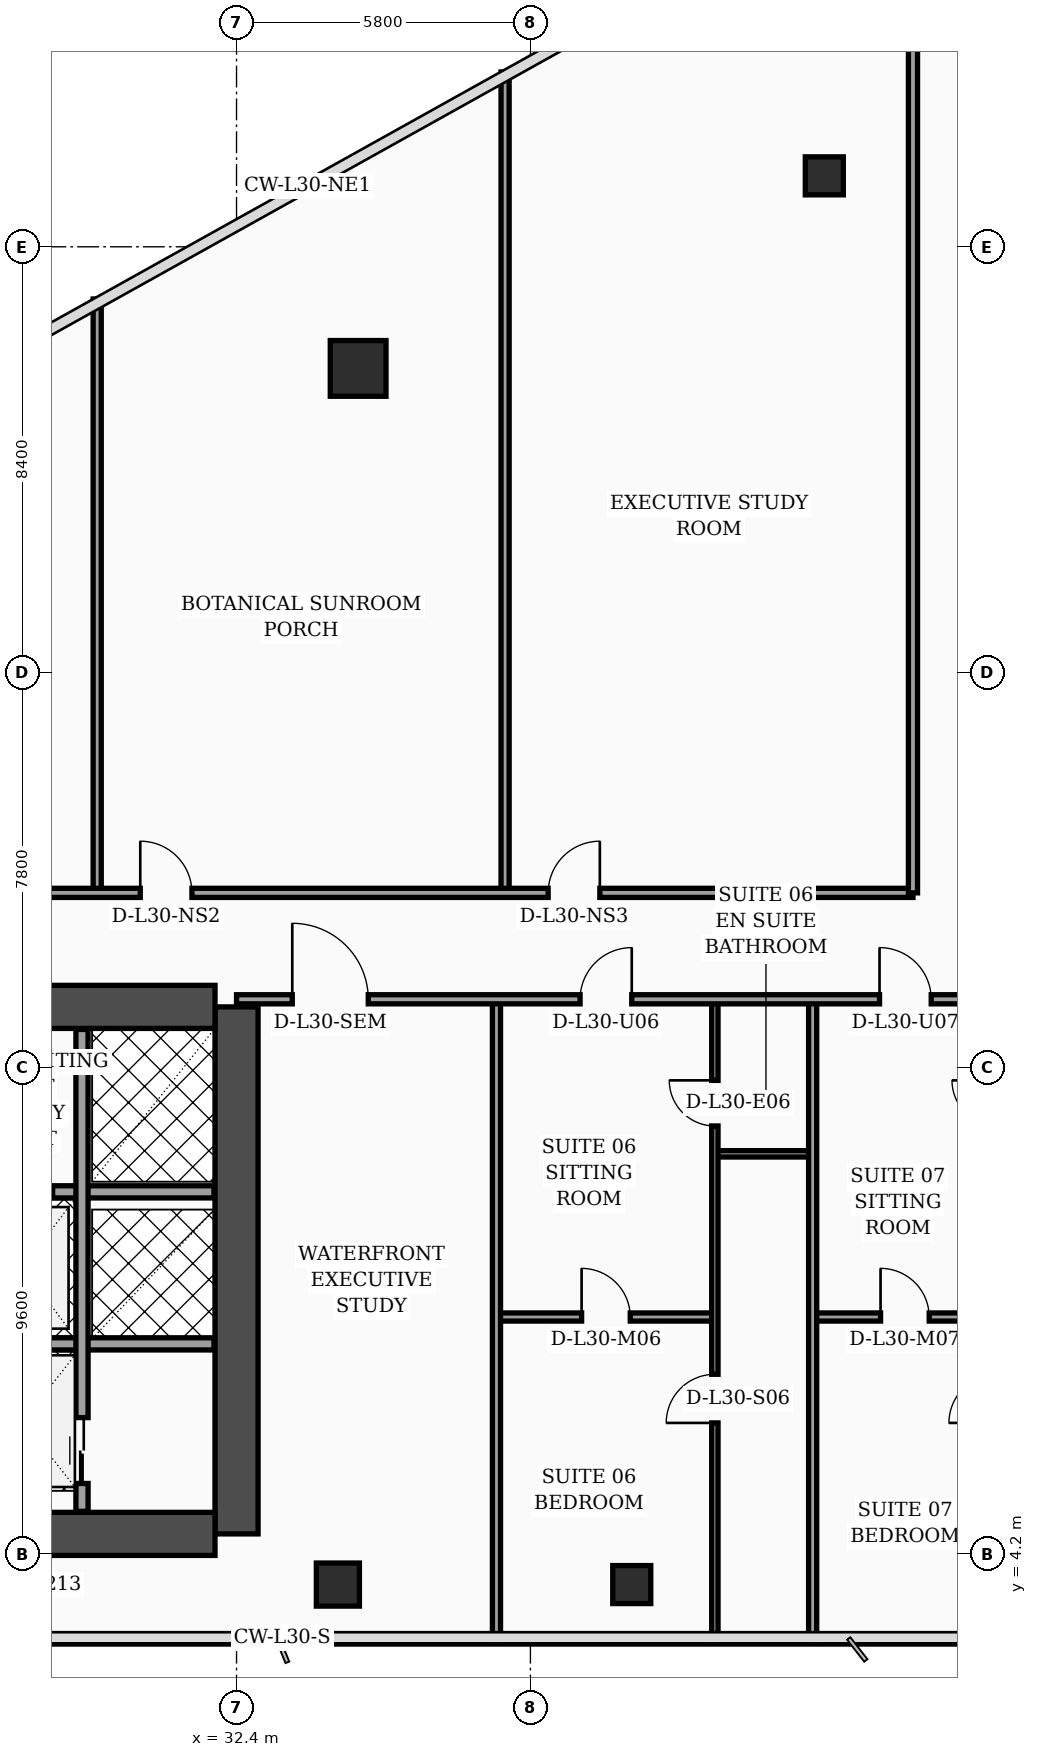
"""IFC4 building model, lengths in metres.
Left out: names, types, materials, properties, quantities, classifications, styles, units other than length and angle.
Written with IfcOpenShell. Run it as: python <this file> out.ifc"""

import sys

from ifc_helpers import new_model, si_unit, direction, frame, frame_2d, origin, origin_2d, place, context, subcontext, project, spatial, rectangle, hollow_rectangle, circle, extrude, element, fill, save


model = new_model("IFC4")
c1 = context("Model", 3, precision=1e-05, world=origin(), true_north=direction((0.0, 1.0)))
c2 = subcontext(c1, "Body", "Model", "MODEL_VIEW")
j1 = project(units=[si_unit("LENGTHUNIT", "METRE"), si_unit("PLANEANGLEUNIT", "RADIAN")], contexts=[c1])
p1 = place(None, origin())
s1 = spatial("IfcSite", under=j1, at=p1, CompositionType="ELEMENT")
p2 = place(p1, origin())
s2 = spatial("IfcBuilding", under=s1, at=p2, CompositionType="ELEMENT")
p3 = place(p2, frame((0.0, 0.0, 124.0)))
s3 = spatial("IfcBuildingStorey", under=s2, at=p3, CompositionType="ELEMENT", Elevation=124.0)
p4 = place(p3, frame((32.4, 4.6, 0.0), z_axis=(0.0, 0.0, 1.0), x_axis=(0.0, 1.0, 0.0)))
e1 = element("IfcWall", 1, at=p4, inside=s3, PredefinedType="SHEAR", context=c2, shape_type="SweptSolid", body=[
    extrude(rectangle(XDim=10.4, YDim=0.85, at=frame_2d((5.2, 0.0))), origin(), (0.0, 0.0, 1.0), 3.56),
])
p5 = place(p3, frame((22.025, 15.0, 0.0), z_axis=(0.0, 0.0, 1.0), x_axis=(1.0, 0.0, 0.0)))
e2 = element("IfcWall", 2, at=p5, inside=s3, PredefinedType="SHEAR", context=c2, shape_type="SweptSolid", body=[
    extrude(rectangle(XDim=9.95, YDim=0.85, at=frame_2d((4.975, 0.0))), origin(), (0.0, 0.0, 1.0), 3.56),
])
p6 = place(p5, frame((4.88, 0.0, 0.0)))
e3 = element("IfcOpeningElement", 3, at=p6, cuts=e2, PredefinedType="OPENING", context=c2, shape_type="SweptSolid", body=[
    extrude(rectangle(XDim=1.1, YDim=2.2, at=frame_2d((0.55, 1.1))), frame((0.0, 0.435, 0.0), z_axis=(0.0, -1.0, 0.0), x_axis=(1.0, 0.0, 0.0)), (0.0, 0.0, 1.0), 0.87),
])
p7 = place(p3, frame((22.025, 4.6, 0.0), z_axis=(0.0, 0.0, 1.0), x_axis=(1.0, 0.0, 0.0)))
e4 = element("IfcWall", 4, at=p7, inside=s3, PredefinedType="SHEAR", context=c2, shape_type="SweptSolid", body=[
    extrude(rectangle(XDim=9.95, YDim=0.85, at=frame_2d((4.975, 0.0))), origin(), (0.0, 0.0, 1.0), 3.56),
])
p8 = place(p3, frame((34.4, 3.6, 0.0), z_axis=(0.0, 0.0, 1.0), x_axis=(1.0, 0.0, 0.0)))
e5 = element("IfcColumn", 5, at=p8, inside=s3, PredefinedType="COLUMN", context=c2, shape_type="SweptSolid", body=[
    extrude(hollow_rectangle(XDim=0.85, YDim=0.85, WallThickness=0.036, at=origin_2d()), origin(), (0.0, 0.0, 1.0), 3.56),
])
p9 = place(p3, frame((40.2, 3.6, 0.0), z_axis=(0.0, 0.0, 1.0), x_axis=(1.0, 0.0, 0.0)))
e6 = element("IfcColumn", 6, at=p9, inside=s3, PredefinedType="COLUMN", context=c2, shape_type="SweptSolid", body=[
    extrude(hollow_rectangle(XDim=0.75, YDim=0.75, WallThickness=0.032, at=origin_2d()), origin(), (0.0, 0.0, 1.0), 3.56),
])
p10 = place(p3, frame((34.8, 27.6, 0.0), z_axis=(0.0, 0.0, 1.0), x_axis=(1.0, 0.0, 0.0)))
e7 = element("IfcColumn", 7, at=p10, inside=s3, PredefinedType="COLUMN", context=c2, shape_type="SweptSolid", body=[
    extrude(circle(Radius=0.55, at=origin_2d()), origin(), (0.0, 0.0, 1.0), 3.56),
])
p11 = place(p3, frame((44.0, 31.4, 0.0), z_axis=(0.0, 0.0, 1.0), x_axis=(1.0, 0.0, 0.0)))
e8 = element("IfcColumn", 8, at=p11, inside=s3, PredefinedType="COLUMN", context=c2, shape_type="SweptSolid", body=[
    extrude(hollow_rectangle(XDim=0.75, YDim=0.75, WallThickness=0.032, at=origin_2d()), origin(), (0.0, 0.0, 1.0), 3.56),
])
p12 = place(p3, frame((27.02, 11.35, 0.0), z_axis=(0.0, 0.0, 1.0), x_axis=(1.0, 0.0, 0.0)))
e9 = element("IfcWall", 9, at=p12, inside=s3, PredefinedType="SOLIDWALL", context=c2, shape_type="SweptSolid", body=[
    extrude(rectangle(XDim=4.935, YDim=0.24, at=frame_2d((2.468, 0.0))), origin(), (0.0, 0.0, 1.0), 3.56),
])
p13 = place(p12, frame((0.45, 0.0, 0.0)))
e10 = element("IfcOpeningElement", 10, at=p13, cuts=e9, PredefinedType="OPENING", context=c2, shape_type="SweptSolid", body=[
    extrude(rectangle(XDim=1.3, YDim=2.35, at=frame_2d((0.65, 1.175))), frame((0.0, 0.13, 0.0), z_axis=(0.0, -1.0, 0.0), x_axis=(1.0, 0.0, 0.0)), (0.0, 0.0, 1.0), 0.26),
])
p14 = place(p3, frame((27.02, 8.35, 0.0), z_axis=(0.0, 0.0, 1.0), x_axis=(1.0, 0.0, 0.0)))
e11 = element("IfcWall", 11, at=p14, inside=s3, PredefinedType="SOLIDWALL", context=c2, shape_type="SweptSolid", body=[
    extrude(rectangle(XDim=4.935, YDim=0.24, at=frame_2d((2.468, 0.0))), origin(), (0.0, 0.0, 1.0), 3.56),
])
p15 = place(p3, frame((29.35, 5.045, 0.0), z_axis=(0.0, 0.0, 1.0), x_axis=(0.0, 1.0, 0.0)))
e12 = element("IfcWall", 12, at=p15, inside=s3, PredefinedType="SOLIDWALL", context=c2, shape_type="SweptSolid", body=[
    extrude(rectangle(XDim=9.51, YDim=0.24, at=frame_2d((4.755, 0.0))), origin(), (0.0, 0.0, 1.0), 3.56),
])
p16 = place(p15, frame((0.55, 0.0, 0.0)))
e13 = element("IfcOpeningElement", 13, at=p16, cuts=e12, PredefinedType="OPENING", context=c2, shape_type="SweptSolid", body=[
    extrude(rectangle(XDim=1.3, YDim=2.35, at=frame_2d((0.65, 1.175))), frame((0.0, 0.13, 0.0), z_axis=(0.0, -1.0, 0.0), x_axis=(1.0, 0.0, 0.0)), (0.0, 0.0, 1.0), 0.26),
])
p17 = place(p3, frame((41.84, 12.1, 0.0), z_axis=(0.0, 0.0, 1.0), x_axis=(1.0, 0.0, 0.0)))
e14 = element("IfcWall", 14, at=p17, inside=s3, PredefinedType="PARTITIONING", context=c2, shape_type="SweptSolid", body=[
    extrude(rectangle(XDim=1.93, YDim=0.125, at=frame_2d((0.965, 0.0))), origin(), (0.0, 0.0, 1.0), 3.56),
])
p18 = place(p3, frame((37.53, 8.88, 0.0), z_axis=(0.0, 0.0, 1.0), x_axis=(1.0, 0.0, 0.0)))
e15 = element("IfcWall", 15, at=p18, inside=s3, PredefinedType="PARTITIONING", context=c2, shape_type="SweptSolid", body=[
    extrude(rectangle(XDim=4.31, YDim=0.16, at=frame_2d((2.155, 0.0))), origin(), (0.0, 0.0, 1.0), 3.56),
])
p19 = place(p18, frame((1.68, 0.0, 0.0)))
e16 = element("IfcOpeningElement", 16, at=p19, cuts=e15, PredefinedType="OPENING", context=c2, shape_type="SweptSolid", body=[
    extrude(rectangle(XDim=0.96, YDim=2.2, at=frame_2d((0.48, 1.1))), frame((0.0, 0.09, 0.0), z_axis=(0.0, -1.0, 0.0), x_axis=(1.0, 0.0, 0.0)), (0.0, 0.0, 1.0), 0.18),
])
p20 = place(p3, frame((41.84, 2.44, 0.0), z_axis=(0.0, 0.0, 1.0), x_axis=(0.0, 1.0, 0.0)))
e17 = element("IfcWall", 17, at=p20, inside=s3, PredefinedType="PARTITIONING", context=c2, shape_type="SweptSolid", body=[
    extrude(rectangle(XDim=12.71, YDim=0.125, at=frame_2d((6.355, 0.0))), origin(), (0.0, 0.0, 1.0), 3.04),
])
p21 = place(p20, frame((4.35, 0.0, 0.0)))
e18 = element("IfcOpeningElement", 18, at=p21, cuts=e17, PredefinedType="OPENING", context=c2, shape_type="SweptSolid", body=[
    extrude(rectangle(XDim=0.96, YDim=2.2, at=frame_2d((0.48, 1.1))), frame((0.0, 0.073, 0.0), z_axis=(0.0, -1.0, 0.0), x_axis=(1.0, 0.0, 0.0)), (0.0, 0.0, 1.0), 0.145),
])
p22 = place(p20, frame((10.21, 0.0, 0.0)))
e19 = element("IfcOpeningElement", 19, at=p22, cuts=e17, PredefinedType="OPENING", context=c2, shape_type="SweptSolid", body=[
    extrude(rectangle(XDim=0.9, YDim=2.15, at=frame_2d((0.45, 1.075))), frame((0.0, 0.073, 0.0), z_axis=(0.0, -1.0, 0.0), x_axis=(1.0, 0.0, 0.0)), (0.0, 0.0, 1.0), 0.145),
])
p23 = place(p3, frame((37.53, 2.44, 0.0), z_axis=(0.0, 0.0, 1.0), x_axis=(0.0, 1.0, 0.0)))
e20 = element("IfcWall", 20, at=p23, inside=s3, PredefinedType="PARTITIONING", context=c2, shape_type="SweptSolid", body=[
    extrude(rectangle(XDim=12.71, YDim=0.16, at=frame_2d((6.355, 0.0))), origin(), (0.0, 0.0, 1.0), 2.84),
])
p24 = place(p3, frame((43.77, 8.88, 0.0), z_axis=(0.0, 0.0, 1.0), x_axis=(1.0, 0.0, 0.0)))
e21 = element("IfcWall", 21, at=p24, inside=s3, PredefinedType="PARTITIONING", context=c2, shape_type="SweptSolid", body=[
    extrude(rectangle(XDim=3.65, YDim=0.16, at=frame_2d((1.825, 0.0))), origin(), (0.0, 0.0, 1.0), 3.56),
])
p25 = place(p24, frame((1.34, 0.0, 0.0)))
e22 = element("IfcOpeningElement", 22, at=p25, cuts=e21, PredefinedType="OPENING", context=c2, shape_type="SweptSolid", body=[
    extrude(rectangle(XDim=0.96, YDim=2.2, at=frame_2d((0.48, 1.1))), frame((0.0, 0.09, 0.0), z_axis=(0.0, -1.0, 0.0), x_axis=(1.0, 0.0, 0.0)), (0.0, 0.0, 1.0), 0.18),
])
p26 = place(p3, frame((43.77, 2.44, 0.0), z_axis=(0.0, 0.0, 1.0), x_axis=(0.0, 1.0, 0.0)))
e23 = element("IfcWall", 23, at=p26, inside=s3, PredefinedType="PARTITIONING", context=c2, shape_type="SweptSolid", body=[
    extrude(rectangle(XDim=12.71, YDim=0.16, at=frame_2d((6.355, 0.0))), origin(), (0.0, 0.0, 1.0), 3.04),
])
p27 = place(p3, frame((32.4, 15.15, 0.0), z_axis=(0.0, 0.0, 1.0), x_axis=(1.0, 0.0, 0.0)))
e24 = element("IfcWall", 24, at=p27, inside=s3, PredefinedType="PARTITIONING", context=c2, shape_type="SweptSolid", body=[
    extrude(rectangle(XDim=16.95, YDim=0.18, at=frame_2d((8.475, 0.0))), origin(), (0.0, 0.0, 1.0), 2.84),
])
p28 = place(p27, frame((1.1, 0.0, 0.0)))
e25 = element("IfcOpeningElement", 25, at=p28, cuts=e24, PredefinedType="OPENING", context=c2, shape_type="SweptSolid", body=[
    extrude(rectangle(XDim=1.5, YDim=2.22, at=frame_2d((0.75, 1.11))), frame((0.0, 0.1, 0.0), z_axis=(0.0, -1.0, 0.0), x_axis=(1.0, 0.0, 0.0)), (0.0, 0.0, 1.0), 0.2),
])
p29 = place(p27, frame((6.78, 0.0, 0.0)))
e26 = element("IfcOpeningElement", 26, at=p29, cuts=e24, PredefinedType="OPENING", context=c2, shape_type="SweptSolid", body=[
    extrude(rectangle(XDim=1.02, YDim=2.2, at=frame_2d((0.51, 1.1))), frame((0.0, 0.1, 0.0), z_axis=(0.0, -1.0, 0.0), x_axis=(1.0, 0.0, 0.0)), (0.0, 0.0, 1.0), 0.2),
])
p30 = place(p27, frame((12.69, 0.0, 0.0)))
e27 = element("IfcOpeningElement", 27, at=p30, cuts=e24, PredefinedType="OPENING", context=c2, shape_type="SweptSolid", body=[
    extrude(rectangle(XDim=1.02, YDim=2.2, at=frame_2d((0.51, 1.1))), frame((0.0, 0.1, 0.0), z_axis=(0.0, -1.0, 0.0), x_axis=(1.0, 0.0, 0.0)), (0.0, 0.0, 1.0), 0.2),
])
p31 = place(p3, frame((29.65, 17.25, 0.0), z_axis=(0.0, 0.0, 1.0), x_axis=(0.0, 1.0, 0.0)))
e28 = element("IfcWall", 28, at=p31, inside=s3, PredefinedType="PARTITIONING", context=c2, shape_type="SweptSolid", body=[
    extrude(rectangle(XDim=11.72, YDim=0.16, at=frame_2d((5.86, 0.0))), origin(), (0.0, 0.0, 1.0), 2.84),
])
p32 = place(p3, frame((37.7, 17.25, 0.0), z_axis=(0.0, 0.0, 1.0), x_axis=(0.0, 1.0, 0.0)))
e29 = element("IfcWall", 29, at=p32, inside=s3, PredefinedType="PARTITIONING", context=c2, shape_type="SweptSolid", body=[
    extrude(rectangle(XDim=16.2, YDim=0.16, at=frame_2d((8.1, 0.0))), origin(), (0.0, 0.0, 1.0), 2.84),
])
p33 = place(p3, frame((21.5, 17.25, 0.0), z_axis=(0.0, 0.0, 1.0), x_axis=(1.0, 0.0, 0.0)))
e30 = element("IfcWall", 30, at=p33, inside=s3, PredefinedType="PARTITIONING", context=c2, shape_type="SweptSolid", body=[
    extrude(rectangle(XDim=24.25, YDim=0.18, at=frame_2d((12.125, 0.0))), origin(), (0.0, 0.0, 1.0), 2.84),
])
p34 = place(p33, frame((0.95, 0.0, 0.0)))
e31 = element("IfcOpeningElement", 31, at=p34, cuts=e30, PredefinedType="OPENING", context=c2, shape_type="SweptSolid", body=[
    extrude(rectangle(XDim=1.02, YDim=2.2, at=frame_2d((0.51, 1.1))), frame((0.0, 0.1, 0.0), z_axis=(0.0, -1.0, 0.0), x_axis=(1.0, 0.0, 0.0)), (0.0, 0.0, 1.0), 0.2),
])
p35 = place(p33, frame((9.0, 0.0, 0.0)))
e32 = element("IfcOpeningElement", 32, at=p35, cuts=e30, PredefinedType="OPENING", context=c2, shape_type="SweptSolid", body=[
    extrude(rectangle(XDim=1.02, YDim=2.2, at=frame_2d((0.51, 1.1))), frame((0.0, 0.1, 0.0), z_axis=(0.0, -1.0, 0.0), x_axis=(1.0, 0.0, 0.0)), (0.0, 0.0, 1.0), 0.2),
])
p36 = place(p33, frame((17.05, 0.0, 0.0)))
e33 = element("IfcOpeningElement", 33, at=p36, cuts=e30, PredefinedType="OPENING", context=c2, shape_type="SweptSolid", body=[
    extrude(rectangle(XDim=1.02, YDim=2.2, at=frame_2d((0.51, 1.1))), frame((0.0, 0.1, 0.0), z_axis=(0.0, -1.0, 0.0), x_axis=(1.0, 0.0, 0.0)), (0.0, 0.0, 1.0), 0.2),
])
p37 = place(p3, frame((45.75, 17.25, 0.0), z_axis=(0.0, 0.0, 1.0), x_axis=(0.0, 1.0, 0.0)))
e34 = element("IfcWall", 34, at=p37, inside=s3, PredefinedType="PARTITIONING", context=c2, shape_type="SweptSolid", body=[
    extrude(rectangle(XDim=20.69, YDim=0.18, at=frame_2d((10.345, 0.0))), origin(), (0.0, 0.0, 1.0), 2.84),
])
p38 = place(p16, origin())
e35 = element("IfcDoor", 35, at=p38, inside=s3, OperationType="DOUBLE_DOOR_SLIDING", PredefinedType="DOOR", context=c2, shape_type="SweptSolid", body=[
    extrude(rectangle(XDim=1.3, YDim=2.35, at=frame_2d((0.65, 1.175))), frame((0.0, 0.025, 0.0), z_axis=(0.0, -1.0, 0.0), x_axis=(1.0, 0.0, 0.0)), (0.0, 0.0, 1.0), 0.05),
])
fill(e13, e35)
p39 = place(p19, origin())
e36 = element("IfcDoor", 36, at=p39, inside=s3, OperationType="SINGLE_SWING_LEFT", PredefinedType="DOOR", context=c2, shape_type="SweptSolid", body=[
    extrude(rectangle(XDim=0.96, YDim=2.2, at=frame_2d((0.48, 1.1))), frame((0.0, 0.025, 0.0), z_axis=(0.0, -1.0, 0.0), x_axis=(1.0, 0.0, 0.0)), (0.0, 0.0, 1.0), 0.05),
])
fill(e16, e36)
p40 = place(p21, origin())
e37 = element("IfcDoor", 37, at=p40, inside=s3, OperationType="SINGLE_SWING_LEFT", PredefinedType="DOOR", context=c2, shape_type="SweptSolid", body=[
    extrude(rectangle(XDim=0.96, YDim=2.2, at=frame_2d((0.48, 1.1))), frame((0.0, 0.025, 0.0), z_axis=(0.0, -1.0, 0.0), x_axis=(1.0, 0.0, 0.0)), (0.0, 0.0, 1.0), 0.05),
])
fill(e18, e37)
p41 = place(p22, origin())
e38 = element("IfcDoor", 38, at=p41, inside=s3, OperationType="SINGLE_SWING_RIGHT", PredefinedType="DOOR", context=c2, shape_type="SweptSolid", body=[
    extrude(rectangle(XDim=0.9, YDim=2.15, at=frame_2d((0.45, 1.075))), frame((0.0, 0.025, 0.0), z_axis=(0.0, -1.0, 0.0), x_axis=(1.0, 0.0, 0.0)), (0.0, 0.0, 1.0), 0.05),
])
fill(e19, e38)
p42 = place(p25, origin())
e39 = element("IfcDoor", 39, at=p42, inside=s3, OperationType="SINGLE_SWING_LEFT", PredefinedType="DOOR", context=c2, shape_type="SweptSolid", body=[
    extrude(rectangle(XDim=0.96, YDim=2.2, at=frame_2d((0.48, 1.1))), frame((0.0, 0.025, 0.0), z_axis=(0.0, -1.0, 0.0), x_axis=(1.0, 0.0, 0.0)), (0.0, 0.0, 1.0), 0.05),
])
fill(e22, e39)
p43 = place(p28, origin())
e40 = element("IfcDoor", 40, at=p43, inside=s3, OperationType="SINGLE_SWING_LEFT", PredefinedType="DOOR", context=c2, shape_type="SweptSolid", body=[
    extrude(rectangle(XDim=1.5, YDim=2.22, at=frame_2d((0.75, 1.11))), frame((0.0, 0.025, 0.0), z_axis=(0.0, -1.0, 0.0), x_axis=(1.0, 0.0, 0.0)), (0.0, 0.0, 1.0), 0.05),
])
fill(e25, e40)
p44 = place(p29, origin())
e41 = element("IfcDoor", 41, at=p44, inside=s3, OperationType="SINGLE_SWING_RIGHT", PredefinedType="DOOR", context=c2, shape_type="SweptSolid", body=[
    extrude(rectangle(XDim=1.02, YDim=2.2, at=frame_2d((0.51, 1.1))), frame((0.0, 0.025, 0.0), z_axis=(0.0, -1.0, 0.0), x_axis=(1.0, 0.0, 0.0)), (0.0, 0.0, 1.0), 0.05),
])
fill(e26, e41)
p45 = place(p30, origin())
e42 = element("IfcDoor", 42, at=p45, inside=s3, OperationType="SINGLE_SWING_LEFT", PredefinedType="DOOR", context=c2, shape_type="SweptSolid", body=[
    extrude(rectangle(XDim=1.02, YDim=2.2, at=frame_2d((0.51, 1.1))), frame((0.0, 0.025, 0.0), z_axis=(0.0, -1.0, 0.0), x_axis=(1.0, 0.0, 0.0)), (0.0, 0.0, 1.0), 0.05),
])
fill(e27, e42)
p46 = place(p35, origin())
e43 = element("IfcDoor", 43, at=p46, inside=s3, OperationType="SINGLE_SWING_LEFT", PredefinedType="DOOR", context=c2, shape_type="SweptSolid", body=[
    extrude(rectangle(XDim=1.02, YDim=2.2, at=frame_2d((0.51, 1.1))), frame((0.0, 0.025, 0.0), z_axis=(0.0, -1.0, 0.0), x_axis=(1.0, 0.0, 0.0)), (0.0, 0.0, 1.0), 0.05),
])
fill(e32, e43)
p47 = place(p36, origin())
e44 = element("IfcDoor", 44, at=p47, inside=s3, OperationType="SINGLE_SWING_RIGHT", PredefinedType="DOOR", context=c2, shape_type="SweptSolid", body=[
    extrude(rectangle(XDim=1.02, YDim=2.2, at=frame_2d((0.51, 1.1))), frame((0.0, 0.025, 0.0), z_axis=(0.0, -1.0, 0.0), x_axis=(1.0, 0.0, 0.0)), (0.0, 0.0, 1.0), 0.05),
])
fill(e33, e44)
save(model, sys.argv[1])
